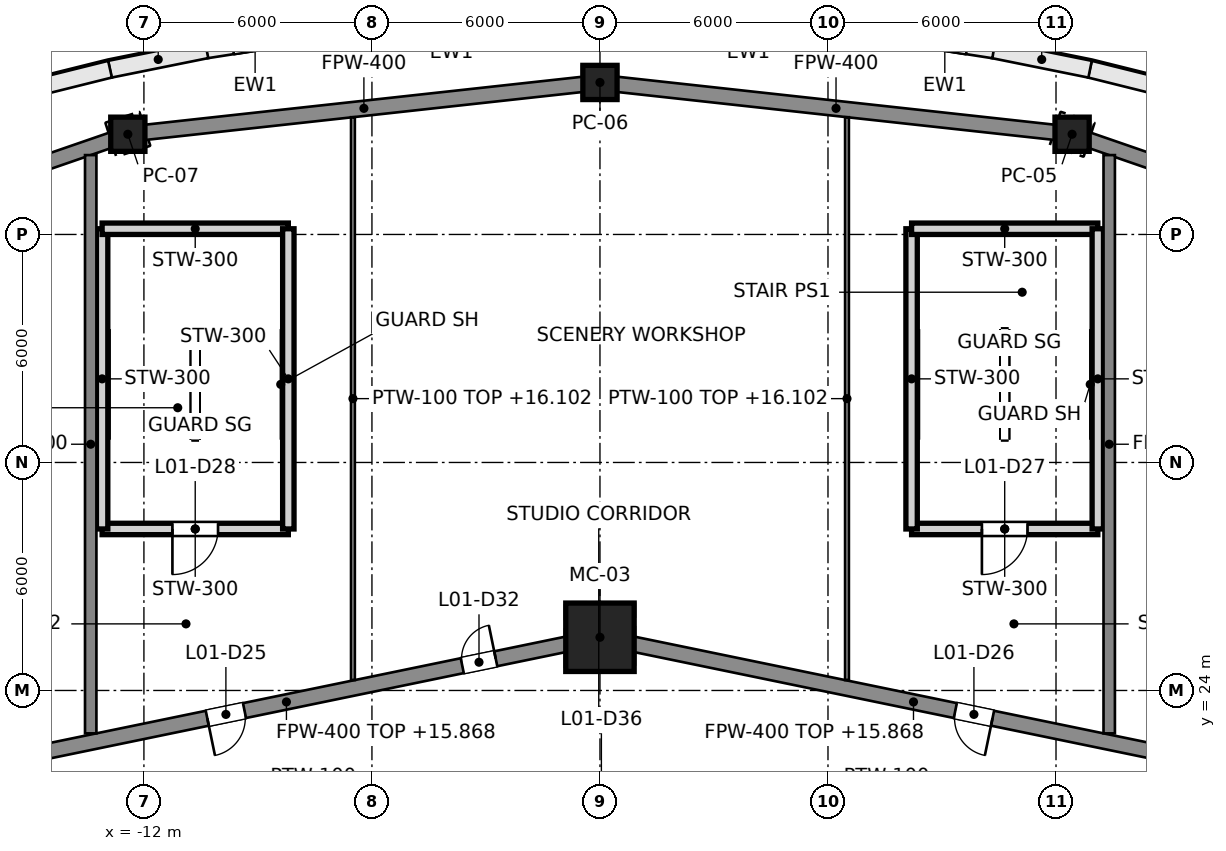
"""IFC4 building model, lengths in metres.
Left out: names, types, materials, properties, quantities, classifications, styles, units other than length and angle.
Written with IfcOpenShell. Run it as: python <this file> out.ifc"""

import sys

from ifc_helpers import new_model, si_unit, direction, frame, frame_2d, origin, origin_2d, place, context, subcontext, project, spatial, polyline, rectangle, hollow_rectangle, outline, extrude, element, fill, save


model = new_model("IFC4")
c1 = context("Model", 3, precision=1e-05, world=origin(), true_north=direction((0.0, 1.0)))
c2 = subcontext(c1, "Body", "Model", "MODEL_VIEW")
j1 = project(units=[si_unit("LENGTHUNIT", "METRE"), si_unit("PLANEANGLEUNIT", "RADIAN")], contexts=[c1])
p1 = place(None, origin())
s1 = spatial("IfcSite", under=j1, at=p1, CompositionType="ELEMENT")
p2 = place(p1, origin())
s2 = spatial("IfcBuilding", under=s1, at=p2, CompositionType="ELEMENT")
p3 = place(p2, frame((0.0, 0.0, 8.0)))
s3 = spatial("IfcBuildingStorey", under=s2, at=p3, CompositionType="ELEMENT", Elevation=8.0)
p4 = place(p3, frame((0.0, 25.4, 0.0), z_axis=(0.0, 0.0, 1.0), x_axis=(0.0, 1.0, 0.0)))
e1 = element("IfcColumn", 1, at=p4, inside=s3, PredefinedType="COLUMN", context=c2, shape_type="SweptSolid", body=[
    extrude(hollow_rectangle(XDim=1.8, YDim=1.8, WallThickness=0.08, at=origin_2d()), origin(), (0.0, 0.0, 1.0), 9.0),
])
for number, where, z_axis, x_axis in (
    (2, (12.423, 38.637, 0.0), (0.0, 0.0, 1.0), (0.306, 0.952, 0.0)),
    (3, (0.0, 40.0, 0.0), (0.0, 0.0, 1.0), (0.0, 1.0, 0.0)),
    (4, (-12.423, 38.637, 0.0), (0.0, 0.0, 1.0), (-0.306, 0.952, 0.0)),
):
    element("IfcColumn", number, at=place(p3, frame(where, z_axis=z_axis, x_axis=x_axis)), inside=s3, PredefinedType="COLUMN", context=c2, shape_type="SweptSolid", body=[
        extrude(hollow_rectangle(XDim=0.9, YDim=0.9, WallThickness=0.04, at=origin_2d()), origin(), (0.0, 0.0, 1.0), 9.0),
    ])
p5 = place(p3, origin())
e5 = element("IfcWall", 5, at=p5, inside=s3, PredefinedType="SOLIDWALL", context=c2, shape_type="SweptSolid", body=[
    extrude(outline(polyline([(25.0, 36.373), (22.699, 37.422), (20.337, 38.369), (17.918, 39.21), (15.451, 39.944), (12.941, 40.569), (12.842, 40.13), (15.332, 39.51), (17.78, 38.782), (20.179, 37.948), (22.522, 37.009), (24.804, 35.968), (25.0, 36.373)])), origin(), (0.0, 0.0, 1.0), 8.8),
])
p6 = place(p3, frame((12.896, 40.348, 0.0), z_axis=(0.0, 0.0, 1.0), x_axis=(-0.980275735323, 0.197634720473, 0.0)))
e6 = element("IfcWall", 6, at=p6, inside=s3, PredefinedType="SOLIDWALL", context=c2, shape_type="SweptSolid", body=[
    extrude(rectangle(XDim=2.597, YDim=0.45, at=frame_2d((1.298, 0.0))), origin(), (0.0, 0.0, 1.0), 8.8),
])
p7 = place(p3, frame((10.361, 40.86, 0.0), z_axis=(0.0, 0.0, 1.0), x_axis=(-0.98810254681, 0.153796479115, 0.0)))
e7 = element("IfcWall", 7, at=p7, inside=s3, PredefinedType="SOLIDWALL", context=c2, shape_type="SweptSolid", body=[
    extrude(rectangle(XDim=2.605, YDim=0.45, at=frame_2d((1.302, 0.0))), origin(), (0.0, 0.0, 1.0), 8.8),
])
p8 = place(p7, frame((0.702, 0.0, 1.0)))
e8 = element("IfcOpeningElement", 8, at=p8, cuts=e7, PredefinedType="OPENING", context=c2, shape_type="SweptSolid", body=[
    extrude(rectangle(XDim=1.2, YDim=1.8, at=frame_2d((0.6, 0.9))), frame((0.0, 0.225, 0.0), z_axis=(0.0, -1.0, 0.0), x_axis=(1.0, 0.0, 0.0)), (0.0, 0.0, 1.0), 0.45),
])
p9 = place(p3, frame((-7.787, 41.26, 0.0), z_axis=(0.0, 0.0, 1.0), x_axis=(-0.98810254681, -0.153796479115, 0.0)))
e9 = element("IfcWall", 9, at=p9, inside=s3, PredefinedType="SOLIDWALL", context=c2, shape_type="SweptSolid", body=[
    extrude(rectangle(XDim=2.605, YDim=0.45, at=frame_2d((1.302, 0.0))), origin(), (0.0, 0.0, 1.0), 8.8),
])
p10 = place(p9, frame((0.702, 0.0, 1.0)))
e10 = element("IfcOpeningElement", 10, at=p10, cuts=e9, PredefinedType="OPENING", context=c2, shape_type="SweptSolid", body=[
    extrude(rectangle(XDim=1.2, YDim=1.8, at=frame_2d((0.6, 0.9))), frame((0.0, 0.225, 0.0), z_axis=(0.0, -1.0, 0.0), x_axis=(1.0, 0.0, 0.0)), (0.0, 0.0, 1.0), 0.45),
])
p11 = place(p3, frame((-10.351, 40.862, 0.0), z_axis=(0.0, 0.0, 1.0), x_axis=(-0.980275735323, -0.197634720473, 0.0)))
e11 = element("IfcWall", 11, at=p11, inside=s3, PredefinedType="SOLIDWALL", context=c2, shape_type="SweptSolid", body=[
    extrude(rectangle(XDim=2.597, YDim=0.45, at=frame_2d((1.298, 0.0))), origin(), (0.0, 0.0, 1.0), 8.8),
])
e12 = element("IfcWall", 12, at=p5, inside=s3, PredefinedType="SOLIDWALL", context=c2, shape_type="SweptSolid", body=[
    extrude(outline(polyline([(-12.941, 40.569), (-15.451, 39.944), (-17.918, 39.21), (-20.337, 38.369), (-22.699, 37.422), (-25.0, 36.373), (-24.804, 35.968), (-22.522, 37.009), (-20.179, 37.948), (-17.78, 38.782), (-15.332, 39.51), (-12.842, 40.13), (-12.941, 40.569)])), origin(), (0.0, 0.0, 1.0), 8.8),
])
p12 = place(p3, frame((13.1, 28.25, 0.0), z_axis=(0.0, 0.0, 1.0), x_axis=(-1.0, 0.0, 0.0)))
e13 = element("IfcWall", 13, at=p12, inside=s3, PredefinedType="SOLIDWALL", context=c2, shape_type="SweptSolid", body=[
    extrude(rectangle(XDim=4.9, YDim=0.3, at=frame_2d((2.45, 0.0))), origin(), (0.0, 0.0, 1.0), 8.8),
])
p13 = place(p12, frame((1.85, 0.0, 0.0)))
e14 = element("IfcOpeningElement", 14, at=p13, cuts=e13, PredefinedType="OPENING", context=c2, shape_type="SweptSolid", body=[
    extrude(rectangle(XDim=1.2, YDim=2.1, at=frame_2d((0.6, 1.05))), frame((0.0, 0.15, 0.0), z_axis=(0.0, -1.0, 0.0), x_axis=(1.0, 0.0, 0.0)), (0.0, 0.0, 1.0), 0.3),
])
p14 = place(p3, frame((8.2, 28.25, 0.0), z_axis=(0.0, 0.0, 1.0), x_axis=(0.0, 1.0, 0.0)))
e15 = element("IfcWall", 15, at=p14, inside=s3, PredefinedType="SOLIDWALL", context=c2, shape_type="SweptSolid", body=[
    extrude(rectangle(XDim=7.9, YDim=0.3, at=frame_2d((3.95, 0.0))), origin(), (0.0, 0.0, 1.0), 8.8),
])
p15 = place(p3, frame((8.2, 36.15, 0.0), z_axis=(0.0, 0.0, 1.0), x_axis=(1.0, 0.0, 0.0)))
e16 = element("IfcWall", 16, at=p15, inside=s3, PredefinedType="SOLIDWALL", context=c2, shape_type="SweptSolid", body=[
    extrude(rectangle(XDim=4.9, YDim=0.3, at=frame_2d((2.45, 0.0))), origin(), (0.0, 0.0, 1.0), 8.8),
])
p16 = place(p3, frame((13.1, 36.15, 0.0), z_axis=(0.0, 0.0, 1.0), x_axis=(0.0, -1.0, 0.0)))
e17 = element("IfcWall", 17, at=p16, inside=s3, PredefinedType="SOLIDWALL", context=c2, shape_type="SweptSolid", body=[
    extrude(rectangle(XDim=7.9, YDim=0.3, at=frame_2d((3.95, 0.0))), origin(), (0.0, 0.0, 1.0), 8.8),
])
p17 = place(p3, frame((-8.2, 28.25, 0.0), z_axis=(0.0, 0.0, 1.0), x_axis=(-1.0, 0.0, 0.0)))
e18 = element("IfcWall", 18, at=p17, inside=s3, PredefinedType="SOLIDWALL", context=c2, shape_type="SweptSolid", body=[
    extrude(rectangle(XDim=4.9, YDim=0.3, at=frame_2d((2.45, 0.0))), origin(), (0.0, 0.0, 1.0), 8.8),
])
p18 = place(p17, frame((1.85, 0.0, 0.0)))
e19 = element("IfcOpeningElement", 19, at=p18, cuts=e18, PredefinedType="OPENING", context=c2, shape_type="SweptSolid", body=[
    extrude(rectangle(XDim=1.2, YDim=2.1, at=frame_2d((0.6, 1.05))), frame((0.0, 0.15, 0.0), z_axis=(0.0, -1.0, 0.0), x_axis=(1.0, 0.0, 0.0)), (0.0, 0.0, 1.0), 0.3),
])
p19 = place(p3, frame((-13.1, 28.25, 0.0), z_axis=(0.0, 0.0, 1.0), x_axis=(0.0, 1.0, 0.0)))
e20 = element("IfcWall", 20, at=p19, inside=s3, PredefinedType="SOLIDWALL", context=c2, shape_type="SweptSolid", body=[
    extrude(rectangle(XDim=7.9, YDim=0.3, at=frame_2d((3.95, 0.0))), origin(), (0.0, 0.0, 1.0), 8.8),
])
p20 = place(p3, frame((-13.1, 36.15, 0.0), z_axis=(0.0, 0.0, 1.0), x_axis=(1.0, 0.0, 0.0)))
e21 = element("IfcWall", 21, at=p20, inside=s3, PredefinedType="SOLIDWALL", context=c2, shape_type="SweptSolid", body=[
    extrude(rectangle(XDim=4.9, YDim=0.3, at=frame_2d((2.45, 0.0))), origin(), (0.0, 0.0, 1.0), 8.8),
])
p21 = place(p3, frame((-8.2, 36.15, 0.0), z_axis=(0.0, 0.0, 1.0), x_axis=(0.0, -1.0, 0.0)))
e22 = element("IfcWall", 22, at=p21, inside=s3, PredefinedType="SOLIDWALL", context=c2, shape_type="SweptSolid", body=[
    extrude(rectangle(XDim=7.9, YDim=0.3, at=frame_2d((3.95, 0.0))), origin(), (0.0, 0.0, 1.0), 8.8),
])
p22 = place(p3, frame((24.0, 34.641, 0.0), z_axis=(0.0, 0.0, 1.0), x_axis=(-0.94527485301, 0.326275117449, 0.0)))
e23 = element("IfcWall", 23, at=p22, inside=s3, PredefinedType="PARTITIONING", context=c2, shape_type="SweptSolid", body=[
    extrude(rectangle(XDim=12.247, YDim=0.4, at=frame_2d((6.124, 0.0))), origin(), (0.0, 0.0, 1.0), 7.877),
])
for number, where, z_axis, x_axis in (
    (24, (12.423, 38.637, 0.0), (0.0, 0.0, 1.0), (-0.994, 0.109, 0.0)),
    (25, (0.0, 40.0, 0.0), (0.0, 0.0, 1.0), (-0.994, -0.109, 0.0)),
):
    element("IfcWall", number, at=place(p3, frame(where, z_axis=z_axis, x_axis=x_axis)), inside=s3, PredefinedType="PARTITIONING", context=c2, shape_type="SweptSolid", body=[
        extrude(rectangle(XDim=12.498, YDim=0.4, at=frame_2d((6.249, 0.0))), origin(), (0.0, 0.0, 1.0), 7.877),
    ])
p23 = place(p3, frame((-12.423, 38.637, 0.0), z_axis=(0.0, 0.0, 1.0), x_axis=(-0.94527485301, -0.326275117449, 0.0)))
e26 = element("IfcWall", 26, at=p23, inside=s3, PredefinedType="PARTITIONING", context=c2, shape_type="SweptSolid", body=[
    extrude(rectangle(XDim=12.247, YDim=0.4, at=frame_2d((6.124, 0.0))), origin(), (0.0, 0.0, 1.0), 7.877),
])
p24 = place(p3, frame((16.5, 21.997, 0.0), z_axis=(0.0, 0.0, 1.0), x_axis=(-0.979389305257, 0.201981654484, 0.0)))
e27 = element("IfcWall", 27, at=p24, inside=s3, PredefinedType="PARTITIONING", context=c2, shape_type="SweptSolid", body=[
    extrude(rectangle(XDim=16.847, YDim=0.4, at=frame_2d((8.424, 0.0))), origin(), (0.0, 0.0, 1.0), 7.868),
])
p25 = place(p24, frame((6.3, 0.0, 0.0)))
e28 = element("IfcOpeningElement", 28, at=p25, cuts=e27, PredefinedType="OPENING", context=c2, shape_type="SweptSolid", body=[
    extrude(rectangle(XDim=1.0, YDim=2.1, at=frame_2d((0.5, 1.05))), frame((0.0, 0.2, 0.0), z_axis=(0.0, -1.0, 0.0), x_axis=(1.0, 0.0, 0.0)), (0.0, 0.0, 1.0), 0.4),
])
p26 = place(p3, frame((0.0, 25.4, 0.0), z_axis=(0.0, 0.0, 1.0), x_axis=(-0.979389305257, -0.201981654484, 0.0)))
e29 = element("IfcWall", 29, at=p26, inside=s3, PredefinedType="PARTITIONING", context=c2, shape_type="SweptSolid", body=[
    extrude(rectangle(XDim=16.847, YDim=0.4, at=frame_2d((8.424, 0.0))), origin(), (0.0, 0.0, 1.0), 7.868),
])
p27 = place(p26, frame((9.55, 0.0, 0.0)))
e30 = element("IfcOpeningElement", 30, at=p27, cuts=e29, PredefinedType="OPENING", context=c2, shape_type="SweptSolid", body=[
    extrude(rectangle(XDim=1.0, YDim=2.1, at=frame_2d((0.5, 1.05))), frame((0.0, 0.2, 0.0), z_axis=(0.0, -1.0, 0.0), x_axis=(1.0, 0.0, 0.0)), (0.0, 0.0, 1.0), 0.4),
])
p28 = place(p26, frame((2.8, 0.0, 0.0)))
e31 = element("IfcOpeningElement", 31, at=p28, cuts=e29, PredefinedType="OPENING", context=c2, shape_type="SweptSolid", body=[
    extrude(rectangle(XDim=0.9, YDim=2.1, at=frame_2d((0.45, 1.05))), frame((0.0, 0.2, 0.0), z_axis=(0.0, -1.0, 0.0), x_axis=(1.0, 0.0, 0.0)), (0.0, 0.0, 1.0), 0.4),
])
for number, where, z_axis, x_axis in (
    (32, (13.4, 22.872, 0.0), (0.0, 0.0, 1.0), (0.0, 1.0, 0.0)),
    (33, (-13.4, 22.872, 0.0), (0.0, 0.0, 1.0), (0.0, 1.0, 0.0)),
):
    element("IfcWall", number, at=place(p3, frame(where, z_axis=z_axis, x_axis=x_axis)), inside=s3, PredefinedType="PARTITIONING", context=c2, shape_type="SweptSolid", body=[
        extrude(rectangle(XDim=15.217, YDim=0.3, at=frame_2d((7.608, 0.0))), origin(), (0.0, 0.0, 1.0), 8.026),
    ])
for number, where, z_axis, x_axis in (
    (34, (6.5, 24.274, 0.0), (0.0, 0.0, 1.0), (0.0, 1.0, 0.0)),
    (35, (-6.5, 24.274, 0.0), (0.0, 0.0, 1.0), (0.0, 1.0, 0.0)),
):
    element("IfcWall", number, at=place(p3, frame(where, z_axis=z_axis, x_axis=x_axis)), inside=s3, PredefinedType="PARTITIONING", context=c2, shape_type="SweptSolid", body=[
        extrude(rectangle(XDim=14.812, YDim=0.1, at=frame_2d((7.406, 0.0))), origin(), (0.0, 0.0, 1.0), 8.102),
    ])
p29 = place(p27, origin())
e36 = element("IfcDoor", 36, at=p29, inside=s3, OperationType="SINGLE_SWING_RIGHT", PredefinedType="DOOR", context=c2, shape_type="SweptSolid", body=[
    extrude(rectangle(XDim=1.0, YDim=2.1, at=frame_2d((0.5, 1.05))), frame((0.0, 0.025, 0.0), z_axis=(0.0, -1.0, 0.0), x_axis=(1.0, 0.0, 0.0)), (0.0, 0.0, 1.0), 0.05),
])
fill(e30, e36)
p30 = place(p25, origin())
e37 = element("IfcDoor", 37, at=p30, inside=s3, OperationType="SINGLE_SWING_LEFT", PredefinedType="DOOR", context=c2, shape_type="SweptSolid", body=[
    extrude(rectangle(XDim=1.0, YDim=2.1, at=frame_2d((0.5, 1.05))), frame((0.0, 0.025, 0.0), z_axis=(0.0, -1.0, 0.0), x_axis=(1.0, 0.0, 0.0)), (0.0, 0.0, 1.0), 0.05),
])
fill(e28, e37)
p31 = place(p13, origin())
e38 = element("IfcDoor", 38, at=p31, inside=s3, OperationType="SINGLE_SWING_RIGHT", PredefinedType="DOOR", context=c2, shape_type="SweptSolid", body=[
    extrude(rectangle(XDim=1.2, YDim=2.1, at=frame_2d((0.6, 1.05))), frame((0.0, 0.025, 0.0), z_axis=(0.0, -1.0, 0.0), x_axis=(1.0, 0.0, 0.0)), (0.0, 0.0, 1.0), 0.05),
])
fill(e14, e38)
p32 = place(p18, origin())
e39 = element("IfcDoor", 39, at=p32, inside=s3, OperationType="SINGLE_SWING_RIGHT", PredefinedType="DOOR", context=c2, shape_type="SweptSolid", body=[
    extrude(rectangle(XDim=1.2, YDim=2.1, at=frame_2d((0.6, 1.05))), frame((0.0, 0.025, 0.0), z_axis=(0.0, -1.0, 0.0), x_axis=(1.0, 0.0, 0.0)), (0.0, 0.0, 1.0), 0.05),
])
fill(e19, e39)
p33 = place(p28, origin())
e40 = element("IfcDoor", 40, at=p33, inside=s3, OperationType="SINGLE_SWING_LEFT", PredefinedType="DOOR", context=c2, shape_type="SweptSolid", body=[
    extrude(rectangle(XDim=0.9, YDim=2.1, at=frame_2d((0.45, 1.05))), frame((0.0, 0.025, 0.0), z_axis=(0.0, -1.0, 0.0), x_axis=(1.0, 0.0, 0.0)), (0.0, 0.0, 1.0), 0.05),
])
fill(e31, e40)
save(model, sys.argv[1])
